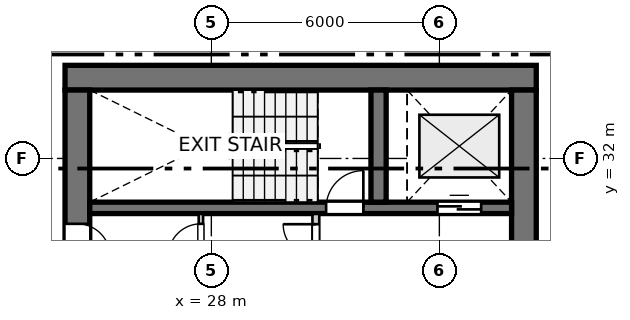
"""IFC4 building model, lengths in metres.
Left out: names, types, materials, properties, quantities, classifications, styles, units other than length and angle.
Written with IfcOpenShell. Run it as: python <this file> out.ifc"""

import sys

from ifc_helpers import new_model, si_unit, direction, frame, frame_2d, origin, place, context, subcontext, project, spatial, rectangle, extrude, source, transform, mapped, element, fill, save


model = new_model("IFC4")
c1 = context("Model", 3, precision=1e-05, world=origin(), true_north=direction((0.0, 1.0)))
c2 = subcontext(c1, "Body", "Model", "MODEL_VIEW")
j1 = project(units=[si_unit("LENGTHUNIT", "METRE"), si_unit("PLANEANGLEUNIT", "RADIAN")], contexts=[c1])
p1 = place(None, origin())
s1 = spatial("IfcSite", under=j1, at=p1, CompositionType="ELEMENT")
p2 = place(p1, origin())
s2 = spatial("IfcBuilding", under=s1, at=p2, CompositionType="ELEMENT")
p3 = place(p2, frame((0.0, 0.0, 83.2)))
s3 = spatial("IfcBuildingStorey", under=s2, at=p3, CompositionType="ELEMENT", Elevation=83.2)
p4 = place(p3, frame((36.55, 34.125, 0.0), z_axis=(0.0, 0.0, 1.0), x_axis=(-1.0, 0.0, 0.0)))
e1 = element("IfcWall", 1, at=p4, inside=s3, PredefinedType="SHEAR", context=c2, shape_type="SweptSolid", body=[
    extrude(rectangle(XDim=12.4, YDim=0.65, at=frame_2d((6.2, 0.0))), origin(), (0.0, 0.0, 1.0), 2.935),
])
p5 = place(p3, frame((24.475, 33.8, 0.0), z_axis=(0.0, 0.0, 1.0), x_axis=(0.0, -1.0, 0.0)))
e2 = element("IfcWall", 2, at=p5, inside=s3, PredefinedType="SHEAR", context=c2, shape_type="SweptSolid", body=[
    extrude(rectangle(XDim=15.6, YDim=0.65, at=frame_2d((7.8, 0.0))), origin(), (0.0, 0.0, 1.0), 2.935),
])
p6 = place(p5, frame((7.05, 0.0, 0.0)))
e3 = element("IfcOpeningElement", 3, at=p6, cuts=e2, PredefinedType="OPENING", context=c2, shape_type="SweptSolid", body=[
    extrude(rectangle(XDim=1.5, YDim=2.15, at=frame_2d((0.75, 1.075))), frame((0.0, 0.335, 0.0), z_axis=(0.0, -1.0, 0.0), x_axis=(1.0, 0.0, 0.0)), (0.0, 0.0, 1.0), 0.67),
])
p7 = place(p5, frame((3.52, 0.0, 0.0)))
e4 = element("IfcOpeningElement", 4, at=p7, cuts=e2, PredefinedType="OPENING", context=c2, shape_type="SweptSolid", body=[
    extrude(rectangle(XDim=0.86, YDim=2.05, at=frame_2d((0.43, 1.025))), frame((0.0, 0.335, 0.0), z_axis=(0.0, -1.0, 0.0), x_axis=(1.0, 0.0, 0.0)), (0.0, 0.0, 1.0), 0.67),
])
p8 = place(p5, frame((11.22, 0.0, 0.0)))
e5 = element("IfcOpeningElement", 5, at=p8, cuts=e2, PredefinedType="OPENING", context=c2, shape_type="SweptSolid", body=[
    extrude(rectangle(XDim=0.86, YDim=2.05, at=frame_2d((0.43, 1.025))), frame((0.0, 0.335, 0.0), z_axis=(0.0, -1.0, 0.0), x_axis=(1.0, 0.0, 0.0)), (0.0, 0.0, 1.0), 0.67),
])
p9 = place(p3, frame((36.225, 18.2, 0.0), z_axis=(0.0, 0.0, 1.0), x_axis=(0.0, 1.0, 0.0)))
e6 = element("IfcWall", 6, at=p9, inside=s3, PredefinedType="SHEAR", context=c2, shape_type="SweptSolid", body=[
    extrude(rectangle(XDim=15.6, YDim=0.65, at=frame_2d((7.8, 0.0))), origin(), (0.0, 0.0, 1.0), 2.935),
])
p10 = place(p9, frame((4.25, 0.0, 0.0)))
e7 = element("IfcOpeningElement", 7, at=p10, cuts=e6, PredefinedType="OPENING", context=c2, shape_type="SweptSolid", body=[
    extrude(rectangle(XDim=1.1, YDim=2.15, at=frame_2d((0.55, 1.075))), frame((0.0, 0.335, 0.0), z_axis=(0.0, -1.0, 0.0), x_axis=(1.0, 0.0, 0.0)), (0.0, 0.0, 1.0), 0.67),
])
p11 = place(p9, frame((10.25, 0.0, 0.0)))
e8 = element("IfcOpeningElement", 8, at=p11, cuts=e6, PredefinedType="OPENING", context=c2, shape_type="SweptSolid", body=[
    extrude(rectangle(XDim=1.1, YDim=2.15, at=frame_2d((0.55, 1.075))), frame((0.0, 0.335, 0.0), z_axis=(0.0, -1.0, 0.0), x_axis=(1.0, 0.0, 0.0)), (0.0, 0.0, 1.0), 0.67),
])
p12 = place(p3, frame((24.8, 30.7, 0.0), z_axis=(0.0, 0.0, 1.0), x_axis=(1.0, 0.0, 0.0)))
e9 = element("IfcWall", 9, at=p12, inside=s3, PredefinedType="SHEAR", context=c2, shape_type="SweptSolid", body=[
    extrude(rectangle(XDim=11.1, YDim=0.3, at=frame_2d((5.55, 0.0))), origin(), (0.0, 0.0, 1.0), 2.935),
])
p13 = place(p12, frame((6.22, 0.0, 0.0)))
e10 = element("IfcOpeningElement", 10, at=p13, cuts=e9, PredefinedType="OPENING", context=c2, shape_type="SweptSolid", body=[
    extrude(rectangle(XDim=0.98, YDim=2.15, at=frame_2d((0.49, 1.075))), frame((0.0, 0.16, 0.0), z_axis=(0.0, -1.0, 0.0), x_axis=(1.0, 0.0, 0.0)), (0.0, 0.0, 1.0), 0.32),
])
p14 = place(p12, frame((9.15, 0.0, 0.0)))
e11 = element("IfcOpeningElement", 11, at=p14, cuts=e9, PredefinedType="OPENING", context=c2, shape_type="SweptSolid", body=[
    extrude(rectangle(XDim=1.15, YDim=2.15, at=frame_2d((0.575, 1.075))), frame((0.0, 0.16, 0.0), z_axis=(0.0, -1.0, 0.0), x_axis=(1.0, 0.0, 0.0)), (0.0, 0.0, 1.0), 0.32),
])
p15 = place(p3, frame((32.4, 30.85, 0.0), z_axis=(0.0, 0.0, 1.0), x_axis=(0.0, 1.0, 0.0)))
e12 = element("IfcWall", 12, at=p15, inside=s3, PredefinedType="SHEAR", context=c2, shape_type="SweptSolid", body=[
    extrude(rectangle(XDim=2.95, YDim=0.4, at=frame_2d((1.475, 0.0))), origin(), (0.0, 0.0, 1.0), 2.935),
])
p16 = place(p3, frame((30.75, 27.43, 0.0), z_axis=(0.0, 0.0, 1.0), x_axis=(0.0, 1.0, 0.0)))
e13 = element("IfcWall", 13, at=p16, inside=s3, PredefinedType="PARTITIONING", context=c2, shape_type="SweptSolid", body=[
    extrude(rectangle(XDim=3.11, YDim=0.18, at=frame_2d((1.555, 0.0))), origin(), (0.0, 0.0, 1.0), 2.935),
])
p17 = place(p16, frame((1.98, 0.0, 0.0)))
e14 = element("IfcOpeningElement", 14, at=p17, cuts=e13, PredefinedType="OPENING", context=c2, shape_type="SweptSolid", body=[
    extrude(rectangle(XDim=0.86, YDim=2.05, at=frame_2d((0.43, 1.025))), frame((0.0, 0.1, 0.0), z_axis=(0.0, -1.0, 0.0), x_axis=(1.0, 0.0, 0.0)), (0.0, 0.0, 1.0), 0.2),
])
p18 = place(p3, frame((27.725, 29.16, 0.0), z_axis=(0.0, 0.0, 1.0), x_axis=(0.0, 1.0, 0.0)))
e15 = element("IfcWall", 15, at=p18, inside=s3, PredefinedType="PARTITIONING", context=c2, shape_type="SweptSolid", body=[
    extrude(rectangle(XDim=1.38, YDim=0.115, at=frame_2d((0.69, 0.0))), origin(), (0.0, 0.0, 1.0), 2.935),
])
p19 = place(p18, frame((0.26, 0.0, 0.0)))
e16 = element("IfcOpeningElement", 16, at=p19, cuts=e15, PredefinedType="OPENING", context=c2, shape_type="SweptSolid", body=[
    extrude(rectangle(XDim=0.86, YDim=2.05, at=frame_2d((0.43, 1.025))), frame((0.0, 0.067, 0.0), z_axis=(0.0, -1.0, 0.0), x_axis=(1.0, 0.0, 0.0)), (0.0, 0.0, 1.0), 0.135),
])
m1 = source(origin(), c2, "Body", "SweptSolid", [
    extrude(rectangle(XDim=0.98, YDim=2.15, at=frame_2d((0.49, 1.075))), frame((0.0, 0.025, 0.0), z_axis=(0.0, -1.0, 0.0), x_axis=(1.0, 0.0, 0.0)), (0.0, 0.0, 1.0), 0.05),
])
p20 = place(p13, origin())
e17 = element("IfcDoor", 17, at=p20, inside=s3, OperationType="SINGLE_SWING_RIGHT", PredefinedType="DOOR", context=c2, shape_type="MappedRepresentation", body=[
    mapped(m1, transform((0.0, 0.0, 0.0), x_axis=(1.0, 0.0, 0.0), y_axis=(0.0, 1.0, 0.0), z_axis=(0.0, 0.0, 1.0), scale=1.0)),
])
fill(e10, e17)
m2 = source(origin(), c2, "Body", "SweptSolid", [
    extrude(rectangle(XDim=1.15, YDim=2.15, at=frame_2d((0.575, 1.075))), frame((0.0, 0.025, 0.0), z_axis=(0.0, -1.0, 0.0), x_axis=(1.0, 0.0, 0.0)), (0.0, 0.0, 1.0), 0.05),
])
p21 = place(p14, origin())
e18 = element("IfcDoor", 18, at=p21, inside=s3, OperationType="DOUBLE_DOOR_SLIDING", PredefinedType="DOOR", context=c2, shape_type="MappedRepresentation", body=[
    mapped(m2, transform((0.0, 0.0, 0.0), x_axis=(1.0, 0.0, 0.0), y_axis=(0.0, 1.0, 0.0), z_axis=(0.0, 0.0, 1.0), scale=1.0)),
])
fill(e11, e18)
m3 = source(origin(), c2, "Body", "SweptSolid", [
    extrude(rectangle(XDim=0.86, YDim=2.05, at=frame_2d((0.43, 1.025))), frame((0.0, 0.025, 0.0), z_axis=(0.0, -1.0, 0.0), x_axis=(1.0, 0.0, 0.0)), (0.0, 0.0, 1.0), 0.05),
])
p22 = place(p7, origin())
e19 = element("IfcDoor", 19, at=p22, inside=s3, OperationType="SINGLE_SWING_RIGHT", PredefinedType="DOOR", context=c2, shape_type="MappedRepresentation", body=[
    mapped(m3, transform((0.0, 0.0, 0.0), x_axis=(1.0, 0.0, 0.0), y_axis=(0.0, 1.0, 0.0), z_axis=(0.0, 0.0, 1.0), scale=1.0)),
])
fill(e4, e19)
p23 = place(p17, origin())
e20 = element("IfcDoor", 20, at=p23, inside=s3, OperationType="SINGLE_SWING_RIGHT", PredefinedType="DOOR", context=c2, shape_type="MappedRepresentation", body=[
    mapped(m3, transform((0.0, 0.0, 0.0), x_axis=(1.0, 0.0, 0.0), y_axis=(0.0, 1.0, 0.0), z_axis=(0.0, 0.0, 1.0), scale=1.0)),
])
fill(e14, e20)
p24 = place(p19, origin())
e21 = element("IfcDoor", 21, at=p24, inside=s3, OperationType="SINGLE_SWING_LEFT", PredefinedType="DOOR", context=c2, shape_type="MappedRepresentation", body=[
    mapped(m3, transform((0.0, 0.0, 0.0), x_axis=(1.0, 0.0, 0.0), y_axis=(0.0, 1.0, 0.0), z_axis=(0.0, 0.0, 1.0), scale=1.0)),
])
fill(e16, e21)
save(model, sys.argv[1])
